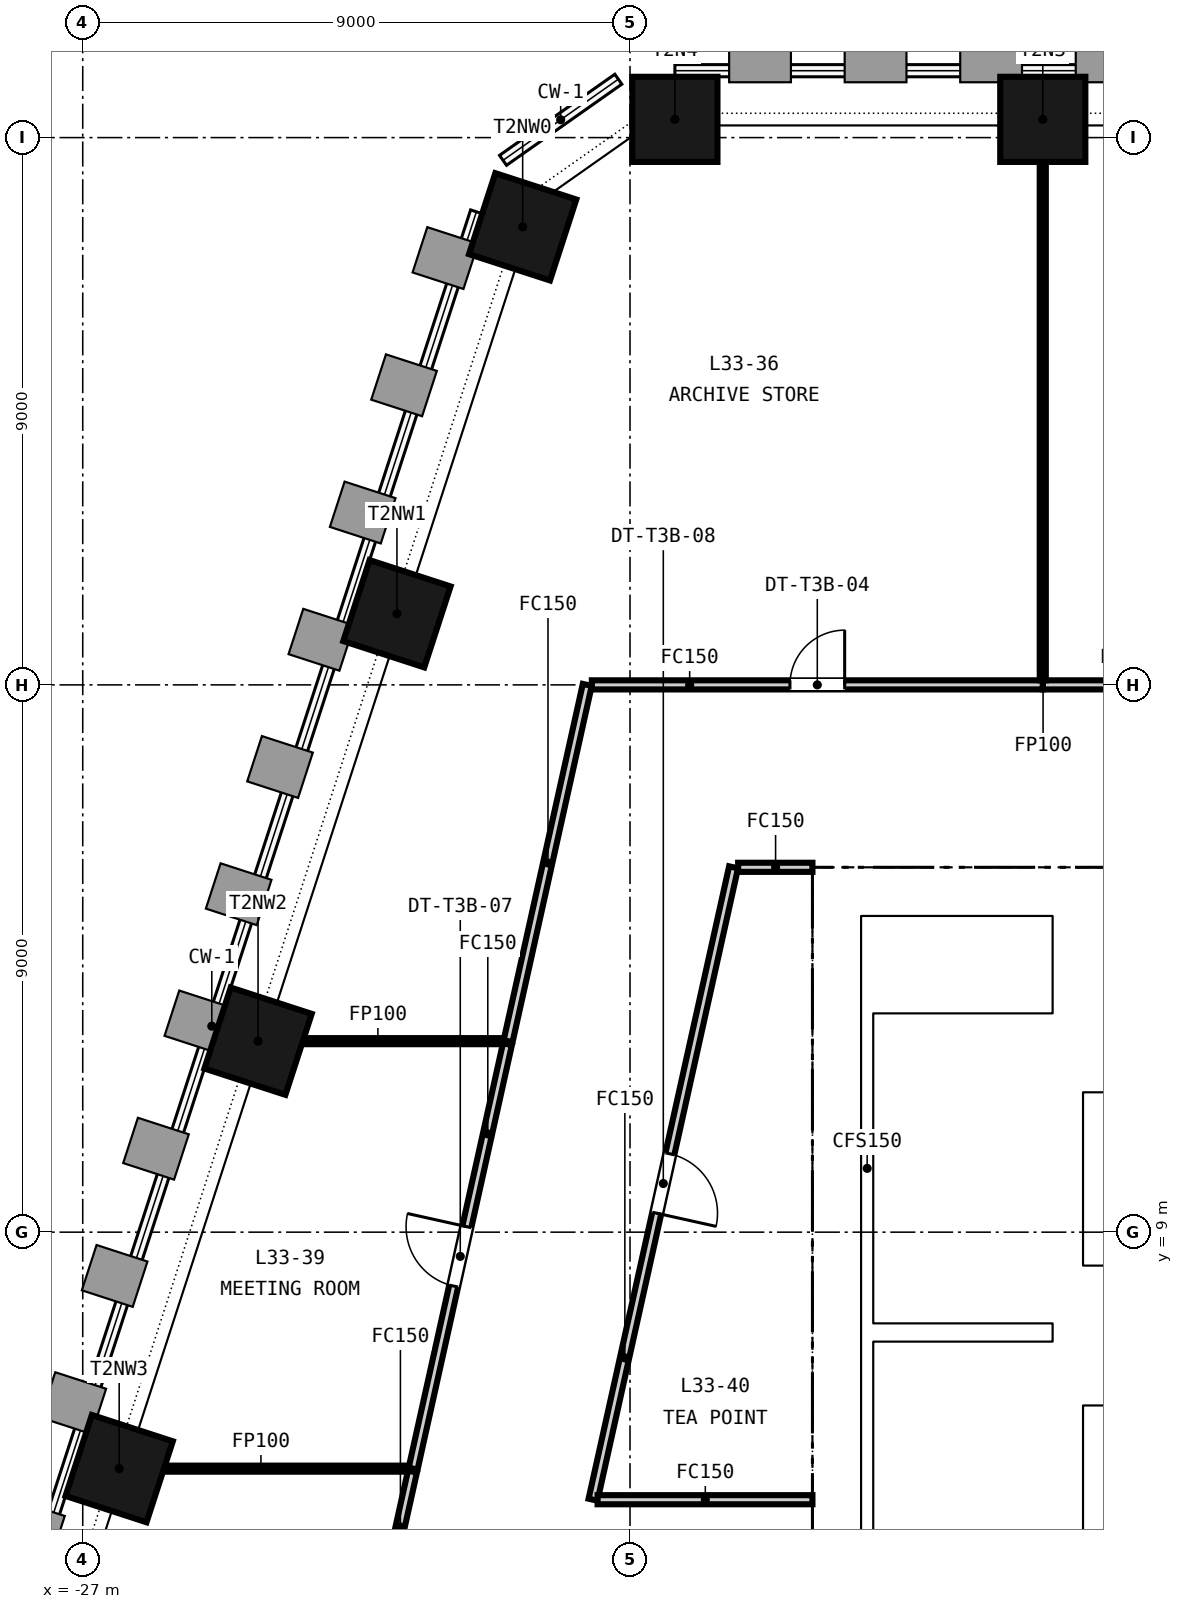
"""IFC4 building model, lengths in metres.
Left out: names, types, materials, properties, quantities, classifications, styles, units other than length and angle.
Written with IfcOpenShell. Run it as: python <this file> out.ifc"""

import sys

from ifc_helpers import new_model, si_unit, direction, frame, frame_2d, origin, origin_2d, place, context, subcontext, project, spatial, rectangle, extrude, element, fill, save


model = new_model("IFC4")
c1 = context("Model", 3, precision=1e-05, world=origin(), true_north=direction((0.0, 1.0)))
c2 = subcontext(c1, "Body", "Model", "MODEL_VIEW")
j1 = project(units=[si_unit("LENGTHUNIT", "METRE"), si_unit("PLANEANGLEUNIT", "RADIAN")], contexts=[c1])
p1 = place(None, origin())
s1 = spatial("IfcSite", under=j1, at=p1, CompositionType="ELEMENT")
p2 = place(p1, origin())
s2 = spatial("IfcBuilding", under=s1, at=p2, CompositionType="ELEMENT")
p3 = place(p2, frame((0.0, 0.0, 137.1)))
s3 = spatial("IfcBuildingStorey", under=s2, at=p3, CompositionType="ELEMENT", Elevation=137.1)
p4 = place(p3, frame((-15.0, 14.6, -0.15), z_axis=(0.0, 0.0, 1.0), x_axis=(1.0, 0.0, 0.0)))
e1 = element("IfcWall", 1, at=p4, inside=s3, PredefinedType="SOLIDWALL", context=c2, shape_type="SweptSolid", body=[
    extrude(rectangle(XDim=30.0, YDim=0.8, at=frame_2d((15.0, 0.0))), origin(), (0.0, 0.0, 1.0), 3.65),
])
p5 = place(p4, frame((9.25, 0.0, 0.15)))
e2 = element("IfcOpeningElement", 2, at=p5, cuts=e1, PredefinedType="OPENING", context=c2, shape_type="SweptSolid", body=[
    extrude(rectangle(XDim=1.5, YDim=2.1, at=frame_2d((0.75, 1.05))), frame((0.0, 0.41, 0.0), z_axis=(0.0, -1.0, 0.0), x_axis=(1.0, 0.0, 0.0)), (0.0, 0.0, 1.0), 0.82),
])
p6 = place(p4, frame((19.4, 0.0, 0.15)))
e3 = element("IfcOpeningElement", 3, at=p6, cuts=e1, PredefinedType="OPENING", context=c2, shape_type="SweptSolid", body=[
    extrude(rectangle(XDim=1.5, YDim=2.1, at=frame_2d((0.75, 1.05))), frame((0.0, 0.41, 0.0), z_axis=(0.0, -1.0, 0.0), x_axis=(1.0, 0.0, 0.0)), (0.0, 0.0, 1.0), 0.82),
])
p7 = place(p4, frame((1.5, 0.0, 0.15)))
e4 = element("IfcOpeningElement", 4, at=p7, cuts=e1, PredefinedType="OPENING", context=c2, shape_type="SweptSolid", body=[
    extrude(rectangle(XDim=1.2, YDim=2.1, at=frame_2d((0.6, 1.05))), frame((0.0, 0.41, 0.0), z_axis=(0.0, -1.0, 0.0), x_axis=(1.0, 0.0, 0.0)), (0.0, 0.0, 1.0), 0.82),
])
p8 = place(p4, frame((27.3, 0.0, 0.15)))
e5 = element("IfcOpeningElement", 5, at=p8, cuts=e1, PredefinedType="OPENING", context=c2, shape_type="SweptSolid", body=[
    extrude(rectangle(XDim=1.2, YDim=2.1, at=frame_2d((0.6, 1.05))), frame((0.0, 0.41, 0.0), z_axis=(0.0, -1.0, 0.0), x_axis=(1.0, 0.0, 0.0)), (0.0, 0.0, 1.0), 0.82),
])
p9 = place(p3, frame((-14.6, 0.8, -0.15), z_axis=(0.0, 0.0, 1.0), x_axis=(0.0, 1.0, 0.0)))
e6 = element("IfcWall", 6, at=p9, inside=s3, PredefinedType="SOLIDWALL", context=c2, shape_type="SweptSolid", body=[
    extrude(rectangle(XDim=13.4, YDim=0.8, at=frame_2d((6.7, 0.0))), origin(), (0.0, 0.0, 1.0), 3.65),
])
p10 = place(p3, frame((-10.8, 0.8, -0.15), z_axis=(0.0, 0.0, 1.0), x_axis=(0.0, 1.0, 0.0)))
e7 = element("IfcWall", 7, at=p10, inside=s3, PredefinedType="SOLIDWALL", context=c2, shape_type="SweptSolid", body=[
    extrude(rectangle(XDim=13.4, YDim=0.5, at=frame_2d((6.7, 0.0))), origin(), (0.0, 0.0, 1.0), 3.65),
])
for number, where, z_axis, x_axis in (
    (8, (-11.212, 27.3, -0.15), (0.0, 0.0, 1.0), (-1.0, 0.0, 0.0)),
    (9, (-17.262, 27.3, -0.15), (0.0, 0.0, 1.0), (-1.0, 0.0, 0.0)),
    (10, (-19.765, 25.533, -0.15), (0.0, 0.0, 1.0), (-0.309, -0.951, 0.0)),
    (11, (-21.833, 19.17, -0.15), (0.0, 0.0, 1.0), (-0.309, -0.951, 0.0)),
    (12, (-24.117, 12.141, -0.15), (0.0, 0.0, 1.0), (-0.309, -0.951, 0.0)),
    (13, (-26.401, 5.111, -0.15), (0.0, 0.0, 1.0), (-0.309, -0.951, 0.0)),
):
    element("IfcColumn", number, at=place(p3, frame(where, z_axis=z_axis, x_axis=x_axis)), inside=s3, PredefinedType="COLUMN", context=c2, shape_type="SweptSolid", body=[
        extrude(rectangle(XDim=1.4, YDim=1.4, at=origin_2d()), origin(), (0.0, 0.0, 1.0), 3.65),
    ])
p11 = place(p3, frame((-10.55, 6.025, 0.0), z_axis=(0.0, 0.0, 1.0), x_axis=(1.0, 0.0, 0.0)))
e14 = element("IfcWall", 14, at=p11, inside=s3, PredefinedType="PARTITIONING", context=c2, shape_type="SweptSolid", body=[
    extrude(rectangle(XDim=21.1, YDim=0.25, at=frame_2d((10.55, 0.0))), origin(), (0.0, 0.0, 1.0), 3.5),
])
p12 = place(p3, frame((-10.55, 8.55, 0.0), z_axis=(0.0, 0.0, 1.0), x_axis=(1.0, 0.0, 0.0)))
e15 = element("IfcWall", 15, at=p12, inside=s3, PredefinedType="PARTITIONING", context=c2, shape_type="SweptSolid", body=[
    extrude(rectangle(XDim=21.1, YDim=0.2, at=frame_2d((10.55, 0.0))), origin(), (0.0, 0.0, 1.0), 3.5),
])
p13 = place(p12, frame((0.675, 0.0, 0.0)))
e16 = element("IfcOpeningElement", 16, at=p13, cuts=e15, PredefinedType="OPENING", context=c2, shape_type="SweptSolid", body=[
    extrude(rectangle(XDim=1.2, YDim=2.1, at=frame_2d((0.6, 1.05))), frame((0.0, 0.11, 0.0), z_axis=(0.0, -1.0, 0.0), x_axis=(1.0, 0.0, 0.0)), (0.0, 0.0, 1.0), 0.22),
])
p14 = place(p12, frame((3.475, 0.0, 0.0)))
e17 = element("IfcOpeningElement", 17, at=p14, cuts=e15, PredefinedType="OPENING", context=c2, shape_type="SweptSolid", body=[
    extrude(rectangle(XDim=1.2, YDim=2.1, at=frame_2d((0.6, 1.05))), frame((0.0, 0.11, 0.0), z_axis=(0.0, -1.0, 0.0), x_axis=(1.0, 0.0, 0.0)), (0.0, 0.0, 1.0), 0.22),
])
p15 = place(p12, frame((6.275, 0.0, 0.0)))
e18 = element("IfcOpeningElement", 18, at=p15, cuts=e15, PredefinedType="OPENING", context=c2, shape_type="SweptSolid", body=[
    extrude(rectangle(XDim=1.2, YDim=2.1, at=frame_2d((0.6, 1.05))), frame((0.0, 0.11, 0.0), z_axis=(0.0, -1.0, 0.0), x_axis=(1.0, 0.0, 0.0)), (0.0, 0.0, 1.0), 0.22),
])
p16 = place(p12, frame((9.075, 0.0, 0.0)))
e19 = element("IfcOpeningElement", 19, at=p16, cuts=e15, PredefinedType="OPENING", context=c2, shape_type="SweptSolid", body=[
    extrude(rectangle(XDim=1.2, YDim=2.1, at=frame_2d((0.6, 1.05))), frame((0.0, 0.11, 0.0), z_axis=(0.0, -1.0, 0.0), x_axis=(1.0, 0.0, 0.0)), (0.0, 0.0, 1.0), 0.22),
])
p17 = place(p12, frame((11.875, 0.0, 0.0)))
e20 = element("IfcOpeningElement", 20, at=p17, cuts=e15, PredefinedType="OPENING", context=c2, shape_type="SweptSolid", body=[
    extrude(rectangle(XDim=1.2, YDim=2.1, at=frame_2d((0.6, 1.05))), frame((0.0, 0.11, 0.0), z_axis=(0.0, -1.0, 0.0), x_axis=(1.0, 0.0, 0.0)), (0.0, 0.0, 1.0), 0.22),
])
p18 = place(p12, frame((14.675, 0.0, 0.0)))
e21 = element("IfcOpeningElement", 21, at=p18, cuts=e15, PredefinedType="OPENING", context=c2, shape_type="SweptSolid", body=[
    extrude(rectangle(XDim=1.2, YDim=2.1, at=frame_2d((0.6, 1.05))), frame((0.0, 0.11, 0.0), z_axis=(0.0, -1.0, 0.0), x_axis=(1.0, 0.0, 0.0)), (0.0, 0.0, 1.0), 0.22),
])
p19 = place(p12, frame((17.475, 0.0, 0.0)))
e22 = element("IfcOpeningElement", 22, at=p19, cuts=e15, PredefinedType="OPENING", context=c2, shape_type="SweptSolid", body=[
    extrude(rectangle(XDim=1.2, YDim=2.1, at=frame_2d((0.6, 1.05))), frame((0.0, 0.11, 0.0), z_axis=(0.0, -1.0, 0.0), x_axis=(1.0, 0.0, 0.0)), (0.0, 0.0, 1.0), 0.22),
])
p20 = place(p12, frame((19.9, 0.0, 0.0)))
e23 = element("IfcOpeningElement", 23, at=p20, cuts=e15, PredefinedType="OPENING", context=c2, shape_type="SweptSolid", body=[
    extrude(rectangle(XDim=0.9, YDim=2.1, at=frame_2d((0.45, 1.05))), frame((0.0, 0.11, 0.0), z_axis=(0.0, -1.0, 0.0), x_axis=(1.0, 0.0, 0.0)), (0.0, 0.0, 1.0), 0.22),
])
p21 = place(p3, frame((-10.55, 11.2, 0.0), z_axis=(0.0, 0.0, 1.0), x_axis=(1.0, 0.0, 0.0)))
e24 = element("IfcWall", 24, at=p21, inside=s3, PredefinedType="PARTITIONING", context=c2, shape_type="SweptSolid", body=[
    extrude(rectangle(XDim=4.8, YDim=0.2, at=frame_2d((2.4, 0.0))), origin(), (0.0, 0.0, 1.0), 3.5),
])
p22 = place(p21, frame((0.525, 0.0, 0.0)))
e25 = element("IfcOpeningElement", 25, at=p22, cuts=e24, PredefinedType="OPENING", context=c2, shape_type="SweptSolid", body=[
    extrude(rectangle(XDim=1.1, YDim=2.1, at=frame_2d((0.55, 1.05))), frame((0.0, 0.11, 0.0), z_axis=(0.0, -1.0, 0.0), x_axis=(1.0, 0.0, 0.0)), (0.0, 0.0, 1.0), 0.22),
])
p23 = place(p21, frame((2.925, 0.0, 0.0)))
e26 = element("IfcOpeningElement", 26, at=p23, cuts=e24, PredefinedType="OPENING", context=c2, shape_type="SweptSolid", body=[
    extrude(rectangle(XDim=1.1, YDim=2.1, at=frame_2d((0.55, 1.05))), frame((0.0, 0.11, 0.0), z_axis=(0.0, -1.0, 0.0), x_axis=(1.0, 0.0, 0.0)), (0.0, 0.0, 1.0), 0.22),
])
p24 = place(p3, frame((-14.0, 7.35, 0.0), z_axis=(0.0, 0.0, 1.0), x_axis=(1.0, 0.0, 0.0)))
e27 = element("IfcWall", 27, at=p24, inside=s3, PredefinedType="SOLIDWALL", context=c2, shape_type="SweptSolid", body=[
    extrude(rectangle(XDim=2.95, YDim=0.3, at=frame_2d((1.475, 0.0))), origin(), (0.0, 0.0, 1.0), 3.5),
])
p25 = place(p3, frame((-14.1, 0.8, 0.0), z_axis=(0.0, 0.0, 1.0), x_axis=(0.0, 1.0, 0.0)))
e28 = element("IfcWall", 28, at=p25, inside=s3, PredefinedType="SOLIDWALL", context=c2, shape_type="SweptSolid", body=[
    extrude(rectangle(XDim=13.4, YDim=0.2, at=frame_2d((6.7, 0.0))), origin(), (0.0, 0.0, 1.0), 3.5),
])
p26 = place(p3, frame((-16.297, 15.0, 0.0), z_axis=(0.0, 0.0, 1.0), x_axis=(-0.216903766867, -0.976192991124, 0.0)))
e29 = element("IfcWall", 29, at=p26, inside=s3, PredefinedType="PARTITIONING", context=c2, shape_type="SweptSolid", body=[
    extrude(rectangle(XDim=10.654, YDim=0.15, at=frame_2d((5.327, 0.0))), origin(), (0.0, 0.0, 1.0), 2.741),
])
p27 = place(p26, frame((4.827, 0.0, 0.0)))
e30 = element("IfcOpeningElement", 30, at=p27, cuts=e29, PredefinedType="OPENING", context=c2, shape_type="SweptSolid", body=[
    extrude(rectangle(XDim=1.0, YDim=2.1, at=frame_2d((0.5, 1.05))), frame((0.0, 0.085, 0.0), z_axis=(0.0, -1.0, 0.0), x_axis=(1.0, 0.0, 0.0)), (0.0, 0.0, 1.0), 0.17),
])
p28 = place(p3, frame((-15.0, 15.0, 0.0), z_axis=(0.0, 0.0, 1.0), x_axis=(-1.0, 0.0, 0.0)))
e31 = element("IfcWall", 31, at=p28, inside=s3, PredefinedType="PARTITIONING", context=c2, shape_type="SweptSolid", body=[
    extrude(rectangle(XDim=1.222, YDim=0.15, at=frame_2d((0.611, 0.0))), origin(), (0.0, 0.0, 1.0), 2.741),
])
p29 = place(p3, frame((-11.212, 18.0, 0.0), z_axis=(0.0, 0.0, 1.0), x_axis=(1.0, 0.0, 0.0)))
e32 = element("IfcWall", 32, at=p29, inside=s3, PredefinedType="PARTITIONING", context=c2, shape_type="SweptSolid", body=[
    extrude(rectangle(XDim=6.75, YDim=0.15, at=frame_2d((3.375, 0.0))), origin(), (0.0, 0.0, 1.0), 2.741),
])
p30 = place(p29, frame((2.875, 0.0, 0.0)))
e33 = element("IfcOpeningElement", 33, at=p30, cuts=e32, PredefinedType="OPENING", context=c2, shape_type="SweptSolid", body=[
    extrude(rectangle(XDim=1.0, YDim=2.1, at=frame_2d((0.5, 1.05))), frame((0.0, 0.085, 0.0), z_axis=(0.0, -1.0, 0.0), x_axis=(1.0, 0.0, 0.0)), (0.0, 0.0, 1.0), 0.17),
])
p31 = place(p3, frame((-20.005, 12.141, 0.0), z_axis=(0.0, 0.0, 1.0), x_axis=(0.216934764879, 0.976186103049, 0.0)))
e34 = element("IfcWall", 34, at=p31, inside=s3, PredefinedType="PARTITIONING", context=c2, shape_type="SweptSolid", body=[
    extrude(rectangle(XDim=6.002, YDim=0.15, at=frame_2d((3.001, 0.0))), origin(), (0.0, 0.0, 1.0), 2.741),
])
p32 = place(p3, frame((-18.628, 18.0, 0.0), z_axis=(0.0, 0.0, 1.0), x_axis=(1.0, 0.0, 0.0)))
e35 = element("IfcWall", 35, at=p32, inside=s3, PredefinedType="PARTITIONING", context=c2, shape_type="SweptSolid", body=[
    extrude(rectangle(XDim=7.416, YDim=0.15, at=frame_2d((3.708, 0.0))), origin(), (0.0, 0.0, 1.0), 2.741),
])
p33 = place(p32, frame((3.258, 0.0, 0.0)))
e36 = element("IfcOpeningElement", 36, at=p33, cuts=e35, PredefinedType="OPENING", context=c2, shape_type="SweptSolid", body=[
    extrude(rectangle(XDim=0.9, YDim=2.1, at=frame_2d((0.45, 1.05))), frame((0.0, 0.085, 0.0), z_axis=(0.0, -1.0, 0.0), x_axis=(1.0, 0.0, 0.0)), (0.0, 0.0, 1.0), 0.17),
])
p34 = place(p3, frame((-11.212, 18.075, 0.0), z_axis=(0.0, 0.0, 1.0), x_axis=(0.0, 1.0, 0.0)))
e37 = element("IfcWall", 37, at=p34, inside=s3, PredefinedType="PARTITIONING", context=c2, shape_type="SweptSolid", body=[
    extrude(rectangle(XDim=9.325, YDim=0.1, at=frame_2d((4.663, 0.0))), origin(), (0.0, 0.0, 1.0), 2.741),
])
p35 = place(p3, frame((-24.222, 12.141, 0.0), z_axis=(0.0, 0.0, 1.0), x_axis=(1.0, 0.0, 0.0)))
e38 = element("IfcWall", 38, at=p35, inside=s3, PredefinedType="PARTITIONING", context=c2, shape_type="SweptSolid", body=[
    extrude(rectangle(XDim=4.142, YDim=0.1, at=frame_2d((2.071, 0.0))), origin(), (0.0, 0.0, 1.0), 2.741),
])
p36 = place(p3, frame((-21.567, 5.111, 0.0), z_axis=(0.0, 0.0, 1.0), x_axis=(0.216883466585, 0.976197501494, 0.0)))
e39 = element("IfcWall", 39, at=p36, inside=s3, PredefinedType="PARTITIONING", context=c2, shape_type="SweptSolid", body=[
    extrude(rectangle(XDim=7.151, YDim=0.15, at=frame_2d((3.576, 0.0))), origin(), (0.0, 0.0, 1.0), 2.741),
])
p37 = place(p36, frame((3.076, 0.0, 0.0)))
e40 = element("IfcOpeningElement", 40, at=p37, cuts=e39, PredefinedType="OPENING", context=c2, shape_type="SweptSolid", body=[
    extrude(rectangle(XDim=1.0, YDim=2.1, at=frame_2d((0.5, 1.05))), frame((0.0, 0.085, 0.0), z_axis=(0.0, -1.0, 0.0), x_axis=(1.0, 0.0, 0.0)), (0.0, 0.0, 1.0), 0.17),
])
p38 = place(p3, frame((-26.506, 5.111, 0.0), z_axis=(0.0, 0.0, 1.0), x_axis=(1.0, 0.0, 0.0)))
e41 = element("IfcWall", 41, at=p38, inside=s3, PredefinedType="PARTITIONING", context=c2, shape_type="SweptSolid", body=[
    extrude(rectangle(XDim=4.863, YDim=0.1, at=frame_2d((2.432, 0.0))), origin(), (0.0, 0.0, 1.0), 2.741),
])
p39 = place(p3, frame((-18.533, 4.6, 0.0), z_axis=(0.0, 0.0, 1.0), x_axis=(1.0, 0.0, 0.0)))
e42 = element("IfcWall", 42, at=p39, inside=s3, PredefinedType="PARTITIONING", context=c2, shape_type="SweptSolid", body=[
    extrude(rectangle(XDim=3.533, YDim=0.15, at=frame_2d((1.767, 0.0))), origin(), (0.0, 0.0, 1.0), 2.741),
])
p40 = place(p3, frame((-21.984, 3.238, 0.0), z_axis=(0.0, 0.0, 1.0), x_axis=(0.217151800435, 0.976137846601, 0.0)))
e43 = element("IfcWall", 43, at=p40, inside=s3, PredefinedType="PARTITIONING", context=c2, shape_type="SweptSolid", body=[
    extrude(rectangle(XDim=1.869, YDim=0.15, at=frame_2d((0.934, 0.0))), origin(), (0.0, 0.0, 1.0), 2.741),
])
p41 = place(p7, origin())
e44 = element("IfcDoor", 44, at=p41, inside=s3, OperationType="SINGLE_SWING_RIGHT", PredefinedType="DOOR", context=c2, shape_type="SweptSolid", body=[
    extrude(rectangle(XDim=1.2, YDim=2.1, at=frame_2d((0.6, 1.05))), frame((0.0, 0.025, 0.0), z_axis=(0.0, -1.0, 0.0), x_axis=(1.0, 0.0, 0.0)), (0.0, 0.0, 1.0), 0.05),
])
fill(e4, e44)
p42 = place(p33, origin())
e45 = element("IfcDoor", 45, at=p42, inside=s3, OperationType="SINGLE_SWING_RIGHT", PredefinedType="DOOR", context=c2, shape_type="SweptSolid", body=[
    extrude(rectangle(XDim=0.9, YDim=2.1, at=frame_2d((0.45, 1.05))), frame((0.0, 0.025, 0.0), z_axis=(0.0, -1.0, 0.0), x_axis=(1.0, 0.0, 0.0)), (0.0, 0.0, 1.0), 0.05),
])
fill(e36, e45)
p43 = place(p37, origin())
e46 = element("IfcDoor", 46, at=p43, inside=s3, OperationType="SINGLE_SWING_RIGHT", PredefinedType="DOOR", context=c2, shape_type="SweptSolid", body=[
    extrude(rectangle(XDim=1.0, YDim=2.1, at=frame_2d((0.5, 1.05))), frame((0.0, 0.025, 0.0), z_axis=(0.0, -1.0, 0.0), x_axis=(1.0, 0.0, 0.0)), (0.0, 0.0, 1.0), 0.05),
])
fill(e40, e46)
p44 = place(p27, origin())
e47 = element("IfcDoor", 47, at=p44, inside=s3, OperationType="SINGLE_SWING_RIGHT", PredefinedType="DOOR", context=c2, shape_type="SweptSolid", body=[
    extrude(rectangle(XDim=1.0, YDim=2.1, at=frame_2d((0.5, 1.05))), frame((0.0, 0.025, 0.0), z_axis=(0.0, -1.0, 0.0), x_axis=(1.0, 0.0, 0.0)), (0.0, 0.0, 1.0), 0.05),
])
fill(e30, e47)
save(model, sys.argv[1])
